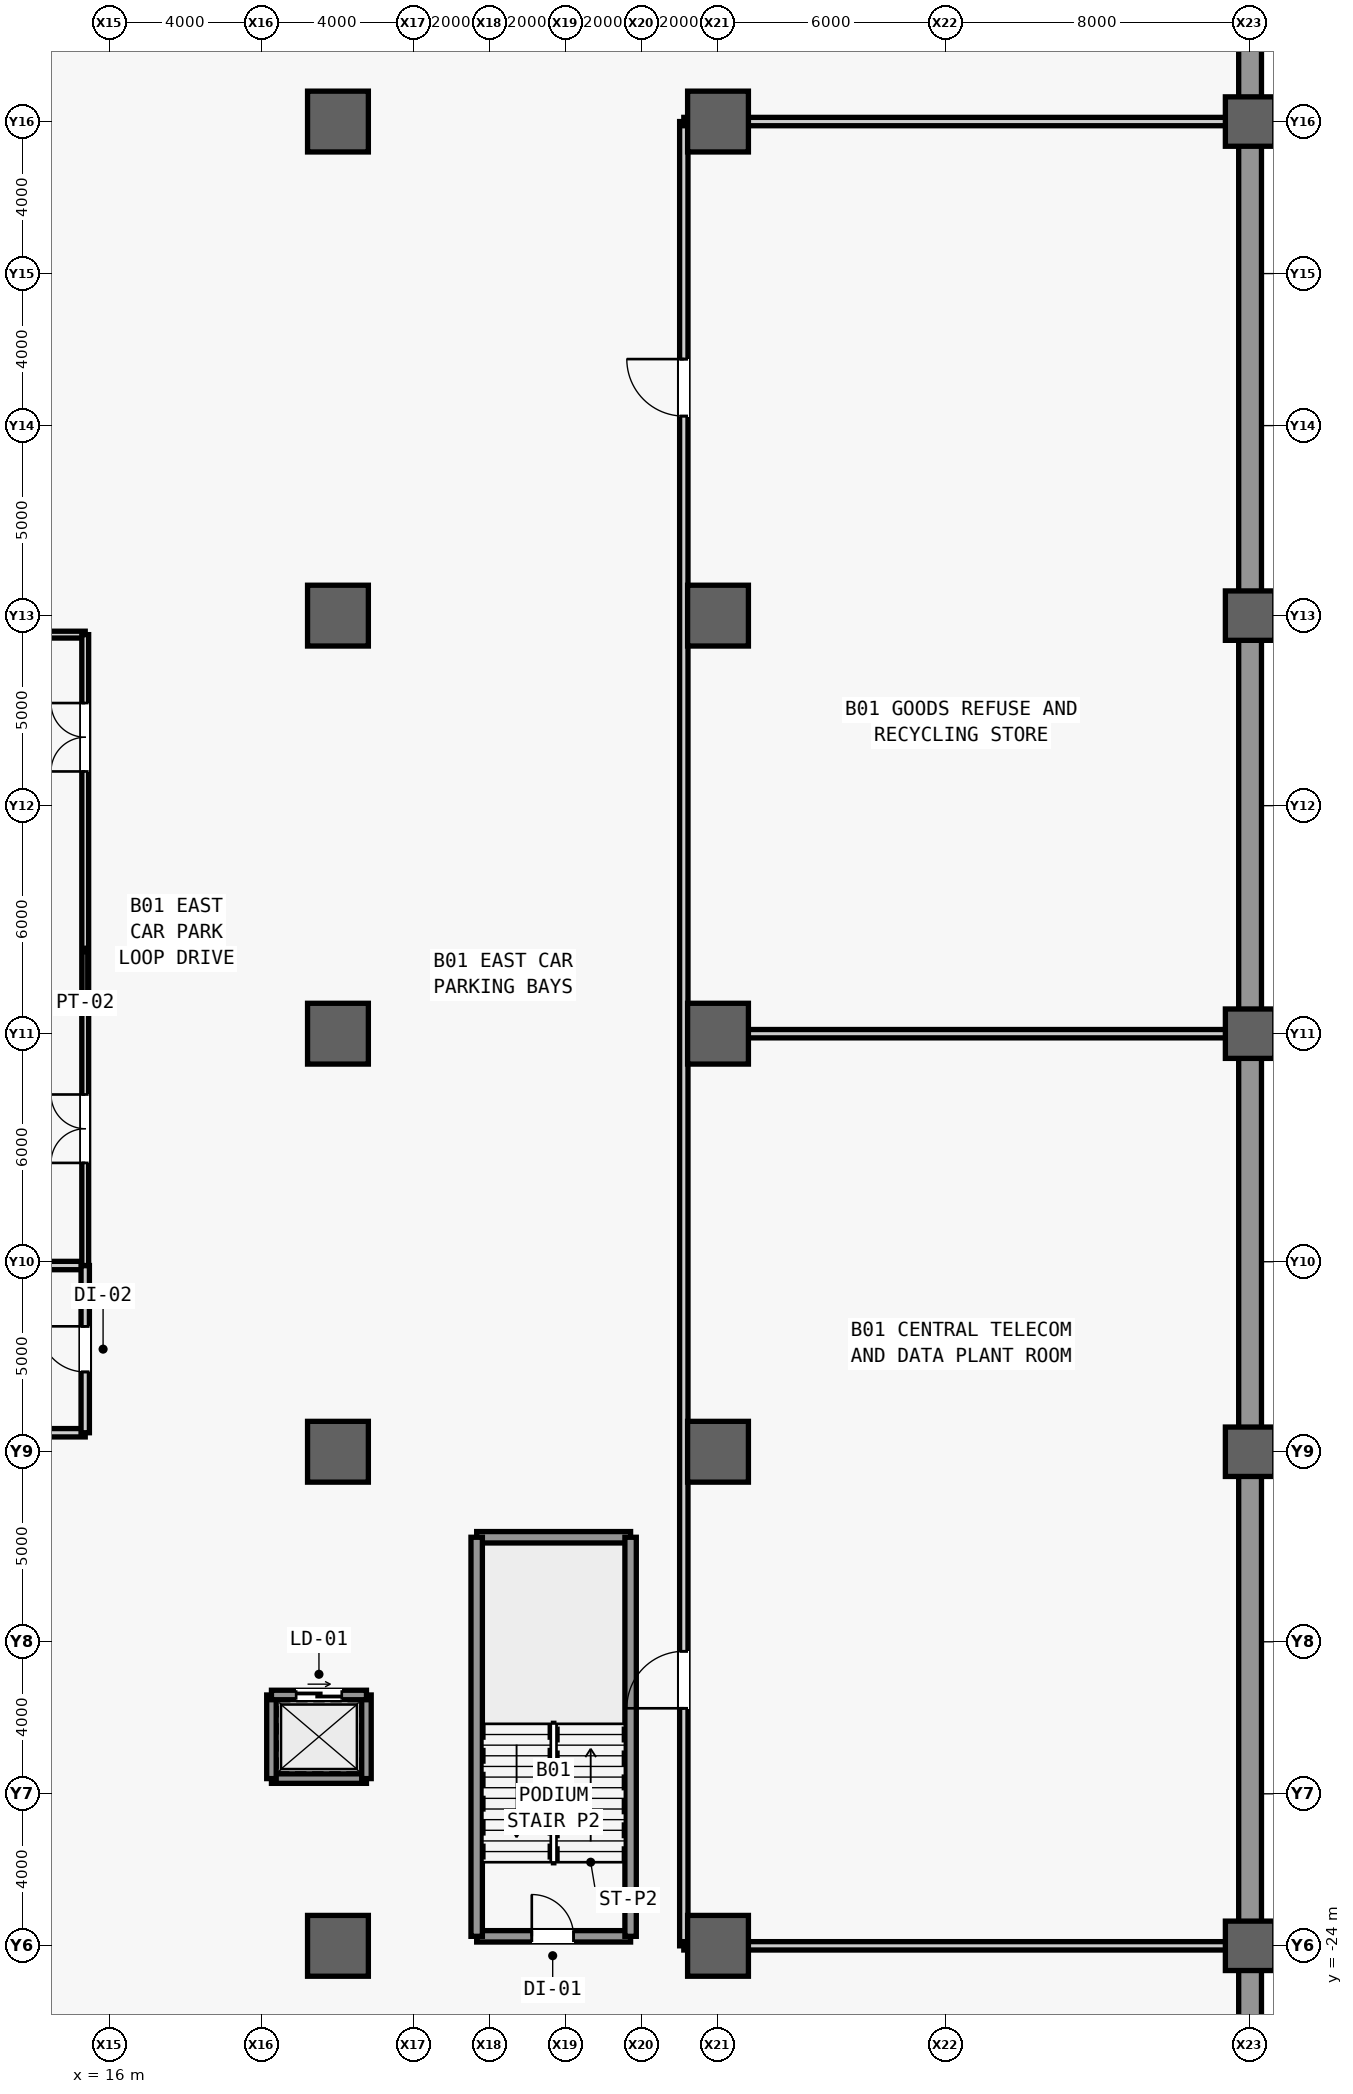
"""IFC4 building model, lengths in metres.
Left out: names, types, materials, properties, quantities, classifications, styles, units other than length and angle.
Written with IfcOpenShell. Run it as: python <this file> out.ifc"""

import sys

from ifc_helpers import new_model, si_unit, direction, frame, frame_2d, origin, origin_2d, place, context, subcontext, project, spatial, rectangle, extrude, source, transform, mapped, element, fill, save


model = new_model("IFC4")
c1 = context("Model", 3, precision=1e-05, world=origin(), true_north=direction((0.0, 1.0)))
c2 = subcontext(c1, "Body", "Model", "MODEL_VIEW")
j1 = project(units=[si_unit("LENGTHUNIT", "METRE"), si_unit("PLANEANGLEUNIT", "RADIAN")], contexts=[c1])
p1 = place(None, origin())
s1 = spatial("IfcSite", under=j1, at=p1, CompositionType="ELEMENT")
p2 = place(p1, origin())
s2 = spatial("IfcBuilding", under=s1, at=p2, CompositionType="ELEMENT")
p3 = place(p2, frame((0.0, 0.0, -4.8)))
s3 = spatial("IfcBuildingStorey", under=s2, at=p3, CompositionType="ELEMENT", Elevation=-4.8)
m1 = source(origin(), c2, "Body", "SweptSolid", [
    extrude(rectangle(XDim=74.8, YDim=0.6, at=frame_2d((37.4, 0.0))), origin(), (0.0, 0.0, 1.0), 4.48),
])
p4 = place(p3, frame((46.0, -37.4, 0.0), z_axis=(0.0, 0.0, 1.0), x_axis=(0.0, 1.0, 0.0)))
e1 = element("IfcWall", 1, at=p4, inside=s3, PredefinedType="USERDEFINED", context=c2, shape_type="MappedRepresentation", body=[
    mapped(m1, transform((0.0, 0.0, 0.0), scale=1.0)),
])
m2 = source(origin(), c2, "Body", "SweptSolid", [
    extrude(rectangle(XDim=1.6, YDim=1.6, at=origin_2d()), origin(), (0.0, 0.0, 1.0), 4.8),
])
for number, where, z_axis, x_axis in (
    (2, (22.0, -24.0, 0.0), (0.0, 0.0, 1.0), (1.0, 0.0, 0.0)),
    (3, (22.0, -11.0, 0.0), (0.0, 0.0, 1.0), (1.0, 0.0, 0.0)),
    (4, (22.0, 0.0, 0.0), (0.0, 0.0, 1.0), (1.0, 0.0, 0.0)),
    (5, (22.0, 11.0, 0.0), (0.0, 0.0, 1.0), (1.0, 0.0, 0.0)),
    (6, (22.0, 24.0, 0.0), (0.0, 0.0, 1.0), (1.0, 0.0, 0.0)),
    (7, (32.0, -24.0, 0.0), (0.0, 0.0, 1.0), (1.0, 0.0, 0.0)),
    (8, (32.0, -11.0, 0.0), (0.0, 0.0, 1.0), (1.0, 0.0, 0.0)),
    (9, (32.0, 0.0, 0.0), (0.0, 0.0, 1.0), (1.0, 0.0, 0.0)),
    (10, (32.0, 11.0, 0.0), (0.0, 0.0, 1.0), (1.0, 0.0, 0.0)),
    (11, (32.0, 24.0, 0.0), (0.0, 0.0, 1.0), (1.0, 0.0, 0.0)),
):
    element("IfcColumn", number, at=place(p3, frame(where, z_axis=z_axis, x_axis=x_axis)), inside=s3, PredefinedType="COLUMN", context=c2, shape_type="MappedRepresentation", body=[
        mapped(m2, transform((0.0, 0.0, 0.0), scale=1.0)),
    ])
m3 = source(origin(), c2, "Body", "SweptSolid", [
    extrude(rectangle(XDim=1.3, YDim=1.3, at=origin_2d()), origin(), (0.0, 0.0, 1.0), 4.8),
])
for number, where, z_axis, x_axis in (
    (12, (46.0, -24.0, 0.0), (0.0, 0.0, 1.0), (1.0, 0.0, 0.0)),
    (13, (46.0, -11.0, 0.0), (0.0, 0.0, 1.0), (1.0, 0.0, 0.0)),
    (14, (46.0, 0.0, 0.0), (0.0, 0.0, 1.0), (1.0, 0.0, 0.0)),
    (15, (46.0, 11.0, 0.0), (0.0, 0.0, 1.0), (1.0, 0.0, 0.0)),
    (16, (46.0, 24.0, 0.0), (0.0, 0.0, 1.0), (1.0, 0.0, 0.0)),
):
    element("IfcColumn", number, at=place(p3, frame(where, z_axis=z_axis, x_axis=x_axis)), inside=s3, PredefinedType="COLUMN", context=c2, shape_type="MappedRepresentation", body=[
        mapped(m3, transform((0.0, 0.0, 0.0), scale=1.0)),
    ])
m4 = source(origin(), c2, "Body", "SweptSolid", [
    extrude(rectangle(XDim=4.05, YDim=0.22, at=frame_2d((2.025, 0.0))), origin(), (0.0, 0.0, 1.0), 4.48),
])
for number, where, z_axis, x_axis in (
    (17, (11.3, -10.5, 0.0), (0.0, 0.0, 1.0), (1.0, 0.0, 0.0)),
    (18, (11.3, -6.1, 0.0), (0.0, 0.0, 1.0), (1.0, 0.0, 0.0)),
):
    element("IfcWall", number, at=place(p3, frame(where, z_axis=z_axis, x_axis=x_axis)), inside=s3, PredefinedType="PARTITIONING", context=c2, shape_type="MappedRepresentation", body=[
        mapped(m4, transform((0.0, 0.0, 0.0), scale=1.0)),
    ])
m5 = source(origin(), c2, "Body", "SweptSolid", [
    extrude(rectangle(XDim=4.4, YDim=0.22, at=frame_2d((2.2, 0.0))), origin(), (0.0, 0.0, 1.0), 4.48),
])
p5 = place(p3, frame((15.35, -10.5, 0.0), z_axis=(0.0, 0.0, 1.0), x_axis=(0.0, 1.0, 0.0)))
e19 = element("IfcWall", 19, at=p5, inside=s3, PredefinedType="PARTITIONING", context=c2, shape_type="MappedRepresentation", body=[
    mapped(m5, transform((0.0, 0.0, 0.0), scale=1.0)),
])
m6 = source(origin(), c2, "Body", "SweptSolid", [
    extrude(rectangle(XDim=1.2, YDim=2.2, at=frame_2d((0.6, 1.1))), frame((0.0, 0.12, 0.0), z_axis=(0.0, -1.0, 0.0), x_axis=(1.0, 0.0, 0.0)), (0.0, 0.0, 1.0), 0.24),
])
p6 = place(p5, frame((1.6, 0.0, 0.0)))
e20 = element("IfcOpeningElement", 20, at=p6, cuts=e19, PredefinedType="OPENING", context=c2, shape_type="MappedRepresentation", body=[
    mapped(m6, transform((0.0, 0.0, 0.0), scale=1.0)),
])
m7 = source(origin(), c2, "Body", "SweptSolid", [
    extrude(rectangle(XDim=4.05, YDim=0.18, at=frame_2d((2.025, 0.0))), origin(), (0.0, 0.0, 1.0), 4.48),
])
p7 = place(p3, frame((11.3, 10.5, 0.0), z_axis=(0.0, 0.0, 1.0), x_axis=(1.0, 0.0, 0.0)))
e21 = element("IfcWall", 21, at=p7, inside=s3, PredefinedType="PARTITIONING", context=c2, shape_type="MappedRepresentation", body=[
    mapped(m7, transform((0.0, 0.0, 0.0), scale=1.0)),
])
m8 = source(origin(), c2, "Body", "SweptSolid", [
    extrude(rectangle(XDim=16.6, YDim=0.18, at=frame_2d((8.3, 0.0))), origin(), (0.0, 0.0, 1.0), 4.48),
])
p8 = place(p3, frame((15.35, -6.1, 0.0), z_axis=(0.0, 0.0, 1.0), x_axis=(0.0, 1.0, 0.0)))
e22 = element("IfcWall", 22, at=p8, inside=s3, PredefinedType="PARTITIONING", context=c2, shape_type="MappedRepresentation", body=[
    mapped(m8, transform((0.0, 0.0, 0.0), scale=1.0)),
])
m9 = source(origin(), c2, "Body", "SweptSolid", [
    extrude(rectangle(XDim=1.8, YDim=2.25, at=frame_2d((0.9, 1.125))), frame((0.0, 0.1, 0.0), z_axis=(0.0, -1.0, 0.0), x_axis=(1.0, 0.0, 0.0)), (0.0, 0.0, 1.0), 0.2),
])
p9 = place(p8, frame((2.7, 0.0, 0.0)))
e23 = element("IfcOpeningElement", 23, at=p9, cuts=e22, PredefinedType="OPENING", context=c2, shape_type="MappedRepresentation", body=[
    mapped(m9, transform((0.0, 0.0, 0.0), scale=1.0)),
])
p10 = place(p8, frame((13.0, 0.0, 0.0)))
e24 = element("IfcOpeningElement", 24, at=p10, cuts=e22, PredefinedType="OPENING", context=c2, shape_type="MappedRepresentation", body=[
    mapped(m9, transform((0.0, 0.0, 0.0), scale=1.0)),
])
m10 = source(origin(), c2, "Body", "SweptSolid", [
    extrude(rectangle(XDim=4.05, YDim=0.3, at=frame_2d((2.025, 0.0))), origin(), (0.0, 0.0, 1.0), 4.48),
])
p11 = place(p3, frame((25.65, -23.75, 0.0), z_axis=(0.0, 0.0, 1.0), x_axis=(1.0, 0.0, 0.0)))
e25 = element("IfcWall", 25, at=p11, inside=s3, PredefinedType="SHEAR", context=c2, shape_type="MappedRepresentation", body=[
    mapped(m10, transform((0.0, 0.0, 0.0), scale=1.0)),
])
m11 = source(origin(), c2, "Body", "SweptSolid", [
    extrude(rectangle(XDim=1.1, YDim=2.2, at=frame_2d((0.55, 1.1))), frame((0.0, 0.16, 0.0), z_axis=(0.0, -1.0, 0.0), x_axis=(1.0, 0.0, 0.0)), (0.0, 0.0, 1.0), 0.32),
])
p12 = place(p11, frame((1.45, 0.0, 0.0)))
e26 = element("IfcOpeningElement", 26, at=p12, cuts=e25, PredefinedType="OPENING", context=c2, shape_type="MappedRepresentation", body=[
    mapped(m11, transform((0.0, 0.0, 0.0), scale=1.0)),
])
p13 = place(p3, frame((25.65, -13.25, 0.0), z_axis=(0.0, 0.0, 1.0), x_axis=(1.0, 0.0, 0.0)))
e27 = element("IfcWall", 27, at=p13, inside=s3, PredefinedType="SHEAR", context=c2, shape_type="MappedRepresentation", body=[
    mapped(m10, transform((0.0, 0.0, 0.0), scale=1.0)),
])
m12 = source(origin(), c2, "Body", "SweptSolid", [
    extrude(rectangle(XDim=10.5, YDim=0.3, at=frame_2d((5.25, 0.0))), origin(), (0.0, 0.0, 1.0), 4.48),
])
for number, where, z_axis, x_axis in (
    (28, (25.65, -23.75, 0.0), (0.0, 0.0, 1.0), (0.0, 1.0, 0.0)),
    (29, (29.7, -23.75, 0.0), (0.0, 0.0, 1.0), (0.0, 1.0, 0.0)),
):
    element("IfcWall", number, at=place(p3, frame(where, z_axis=z_axis, x_axis=x_axis)), inside=s3, PredefinedType="SHEAR", context=c2, shape_type="MappedRepresentation", body=[
        mapped(m12, transform((0.0, 0.0, 0.0), scale=1.0)),
    ])
m13 = source(origin(), c2, "Body", "SweptSolid", [
    extrude(rectangle(XDim=2.5, YDim=0.25, at=frame_2d((1.25, 0.0))), origin(), (0.0, 0.0, 1.0), 4.48),
])
p14 = place(p3, frame((20.25, -19.6, 0.0), z_axis=(0.0, 0.0, 1.0), x_axis=(1.0, 0.0, 0.0)))
e30 = element("IfcWall", 30, at=p14, inside=s3, PredefinedType="SHEAR", context=c2, shape_type="MappedRepresentation", body=[
    mapped(m13, transform((0.0, 0.0, 0.0), scale=1.0)),
])
m14 = source(origin(), c2, "Body", "SweptSolid", [
    extrude(rectangle(XDim=2.2, YDim=0.25, at=frame_2d((1.1, 0.0))), origin(), (0.0, 0.0, 1.0), 4.48),
])
for number, where, z_axis, x_axis in (
    (31, (20.25, -19.6, 0.0), (0.0, 0.0, 1.0), (0.0, 1.0, 0.0)),
    (32, (22.75, -19.6, 0.0), (0.0, 0.0, 1.0), (0.0, 1.0, 0.0)),
):
    element("IfcWall", number, at=place(p3, frame(where, z_axis=z_axis, x_axis=x_axis)), inside=s3, PredefinedType="SHEAR", context=c2, shape_type="MappedRepresentation", body=[
        mapped(m14, transform((0.0, 0.0, 0.0), scale=1.0)),
    ])
p15 = place(p3, frame((20.25, -17.4, 0.0), z_axis=(0.0, 0.0, 1.0), x_axis=(1.0, 0.0, 0.0)))
e33 = element("IfcWall", 33, at=p15, inside=s3, PredefinedType="SHEAR", context=c2, shape_type="MappedRepresentation", body=[
    mapped(m13, transform((0.0, 0.0, 0.0), scale=1.0)),
])
m15 = source(origin(), c2, "Body", "SweptSolid", [
    extrude(rectangle(XDim=1.2, YDim=2.3, at=frame_2d((0.6, 1.15))), frame((0.0, 0.135, 0.0), z_axis=(0.0, -1.0, 0.0), x_axis=(1.0, 0.0, 0.0)), (0.0, 0.0, 1.0), 0.27),
])
p16 = place(p15, frame((0.65, 0.0, 0.0)))
e34 = element("IfcOpeningElement", 34, at=p16, cuts=e33, PredefinedType="OPENING", context=c2, shape_type="MappedRepresentation", body=[
    mapped(m15, transform((0.0, 0.0, 0.0), scale=1.0)),
])
m16 = source(origin(), c2, "Body", "SweptSolid", [
    extrude(rectangle(XDim=14.7, YDim=0.22, at=frame_2d((7.35, 0.0))), origin(), (0.0, 0.0, 1.0), 2.68),
])
p17 = place(p3, frame((31.1, 0.0, 0.0), z_axis=(0.0, 0.0, 1.0), x_axis=(1.0, 0.0, 0.0)))
e35 = element("IfcWall", 35, at=p17, inside=s3, PredefinedType="PARTITIONING", context=c2, shape_type="MappedRepresentation", body=[
    mapped(m16, transform((0.0, 0.0, 0.0), scale=1.0)),
])
m17 = source(origin(), c2, "Body", "SweptSolid", [
    extrude(rectangle(XDim=48.0, YDim=0.22, at=frame_2d((24.0, 0.0))), origin(), (0.0, 0.0, 1.0), 4.48),
])
p18 = place(p3, frame((31.1, -24.0, 0.0), z_axis=(0.0, 0.0, 1.0), x_axis=(0.0, 1.0, 0.0)))
e36 = element("IfcWall", 36, at=p18, inside=s3, PredefinedType="PARTITIONING", context=c2, shape_type="MappedRepresentation", body=[
    mapped(m17, transform((0.0, 0.0, 0.0), scale=1.0)),
])
m18 = source(origin(), c2, "Body", "SweptSolid", [
    extrude(rectangle(XDim=1.5, YDim=2.3, at=frame_2d((0.75, 1.15))), frame((0.0, 0.12, 0.0), z_axis=(0.0, -1.0, 0.0), x_axis=(1.0, 0.0, 0.0)), (0.0, 0.0, 1.0), 0.24),
])
p19 = place(p18, frame((6.25, 0.0, 0.0)))
e37 = element("IfcOpeningElement", 37, at=p19, cuts=e36, PredefinedType="OPENING", context=c2, shape_type="MappedRepresentation", body=[
    mapped(m18, transform((0.0, 0.0, 0.0), scale=1.0)),
])
p20 = place(p18, frame((40.25, 0.0, 0.0)))
e38 = element("IfcOpeningElement", 38, at=p20, cuts=e36, PredefinedType="OPENING", context=c2, shape_type="MappedRepresentation", body=[
    mapped(m18, transform((0.0, 0.0, 0.0), scale=1.0)),
])
for number, where, z_axis, x_axis in (
    (39, (31.1, -24.0, 0.0), (0.0, 0.0, 1.0), (1.0, 0.0, 0.0)),
    (40, (31.1, 24.0, 0.0), (0.0, 0.0, 1.0), (1.0, 0.0, 0.0)),
):
    element("IfcWall", number, at=place(p3, frame(where, z_axis=z_axis, x_axis=x_axis)), inside=s3, PredefinedType="PARTITIONING", context=c2, shape_type="MappedRepresentation", body=[
        mapped(m16, transform((0.0, 0.0, 0.0), scale=1.0)),
    ])
m19 = source(origin(), c2, "Body", "SweptSolid", [
    extrude(rectangle(XDim=1.2, YDim=2.2, at=frame_2d((0.6, 1.1))), frame((0.0, 0.025, 0.0), z_axis=(0.0, -1.0, 0.0), x_axis=(1.0, 0.0, 0.0)), (0.0, 0.0, 1.0), 0.05),
])
p21 = place(p6, origin())
e41 = element("IfcDoor", 41, at=p21, inside=s3, OperationType="SINGLE_SWING_RIGHT", PredefinedType="DOOR", context=c2, shape_type="MappedRepresentation", body=[
    mapped(m19, transform((0.0, 0.0, 0.0), scale=1.0)),
])
fill(e20, e41)
m20 = source(origin(), c2, "Body", "SweptSolid", [
    extrude(rectangle(XDim=1.8, YDim=2.25, at=frame_2d((0.9, 1.125))), frame((0.0, 0.025, 0.0), z_axis=(0.0, -1.0, 0.0), x_axis=(1.0, 0.0, 0.0)), (0.0, 0.0, 1.0), 0.05),
])
p22 = place(p9, origin())
e42 = element("IfcDoor", 42, at=p22, inside=s3, OperationType="SINGLE_SWING_RIGHT", PredefinedType="DOOR", context=c2, shape_type="MappedRepresentation", body=[
    mapped(m20, transform((0.0, 0.0, 0.0), scale=1.0)),
])
fill(e23, e42)
p23 = place(p10, origin())
e43 = element("IfcDoor", 43, at=p23, inside=s3, OperationType="SINGLE_SWING_LEFT", PredefinedType="DOOR", context=c2, shape_type="MappedRepresentation", body=[
    mapped(m20, transform((0.0, 0.0, 0.0), scale=1.0)),
])
fill(e24, e43)
m21 = source(origin(), c2, "Body", "SweptSolid", [
    extrude(rectangle(XDim=1.1, YDim=2.2, at=frame_2d((0.55, 1.1))), frame((0.0, 0.025, 0.0), z_axis=(0.0, -1.0, 0.0), x_axis=(1.0, 0.0, 0.0)), (0.0, 0.0, 1.0), 0.05),
])
p24 = place(p12, origin())
e44 = element("IfcDoor", 44, at=p24, inside=s3, OperationType="SINGLE_SWING_LEFT", PredefinedType="DOOR", context=c2, shape_type="MappedRepresentation", body=[
    mapped(m21, transform((0.0, 0.0, 0.0), scale=1.0)),
])
fill(e26, e44)
m22 = source(origin(), c2, "Body", "SweptSolid", [
    extrude(rectangle(XDim=1.5, YDim=2.3, at=frame_2d((0.75, 1.15))), frame((0.0, 0.025, 0.0), z_axis=(0.0, -1.0, 0.0), x_axis=(1.0, 0.0, 0.0)), (0.0, 0.0, 1.0), 0.05),
])
p25 = place(p19, origin())
e45 = element("IfcDoor", 45, at=p25, inside=s3, OperationType="SINGLE_SWING_LEFT", PredefinedType="DOOR", context=c2, shape_type="MappedRepresentation", body=[
    mapped(m22, transform((0.0, 0.0, 0.0), scale=1.0)),
])
fill(e37, e45)
p26 = place(p20, origin())
e46 = element("IfcDoor", 46, at=p26, inside=s3, OperationType="SINGLE_SWING_RIGHT", PredefinedType="DOOR", context=c2, shape_type="MappedRepresentation", body=[
    mapped(m22, transform((0.0, 0.0, 0.0), scale=1.0)),
])
fill(e38, e46)
m23 = source(origin(), c2, "Body", "SweptSolid", [
    extrude(rectangle(XDim=1.2, YDim=2.3, at=frame_2d((0.6, 1.15))), frame((0.0, 0.025, 0.0), z_axis=(0.0, -1.0, 0.0), x_axis=(1.0, 0.0, 0.0)), (0.0, 0.0, 1.0), 0.05),
])
p27 = place(p16, origin())
e47 = element("IfcDoor", 47, at=p27, inside=s3, OperationType="SLIDING_TO_LEFT", PredefinedType="DOOR", context=c2, shape_type="MappedRepresentation", body=[
    mapped(m23, transform((0.0, 0.0, 0.0), scale=1.0)),
])
fill(e34, e47)
save(model, sys.argv[1])
